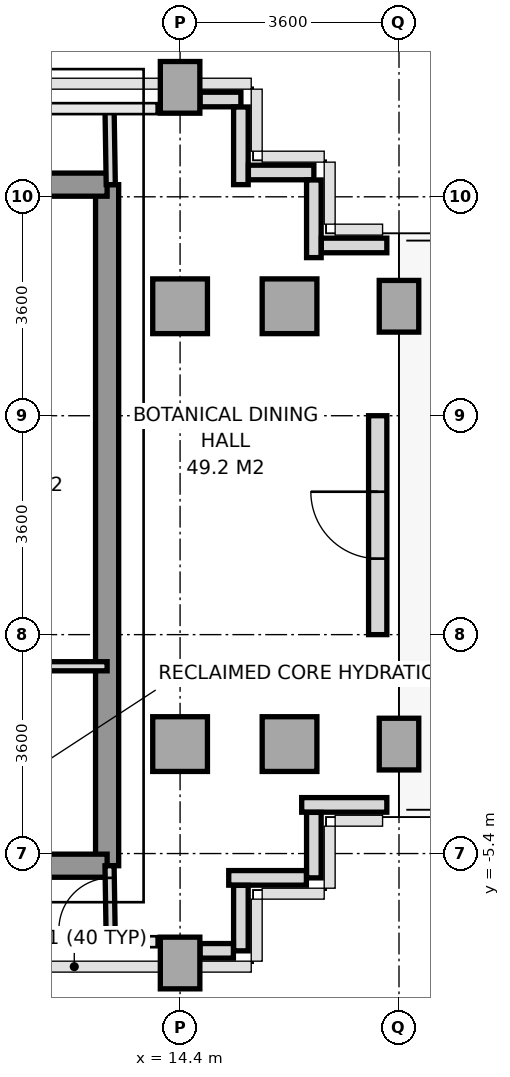
"""IFC4 building model, lengths in metres.
Left out: names, types, materials, properties, quantities, classifications, styles, units other than length and angle.
Written with IfcOpenShell. Run it as: python <this file> out.ifc"""

import sys

from ifc_helpers import new_model, si_unit, direction, frame, frame_2d, origin, origin_2d, place, context, subcontext, project, spatial, rectangle, extrude, source, transform, mapped, element, fill, save


model = new_model("IFC4")
c1 = context("Model", 3, precision=1e-05, world=origin(), true_north=direction((0.0, 1.0)))
c2 = subcontext(c1, "Body", "Model", "MODEL_VIEW")
j1 = project(units=[si_unit("LENGTHUNIT", "METRE"), si_unit("PLANEANGLEUNIT", "RADIAN")], contexts=[c1])
p1 = place(None, origin())
s1 = spatial("IfcSite", under=j1, at=p1, CompositionType="ELEMENT")
p2 = place(p1, origin())
s2 = spatial("IfcBuilding", under=s1, at=p2, CompositionType="ELEMENT")
p3 = place(p2, frame((0.0, 0.0, 156.2)))
s3 = spatial("IfcBuildingStorey", under=s2, at=p3, CompositionType="ELEMENT", Elevation=156.2)
m1 = source(origin(), c2, "Body", "SweptSolid", [
    extrude(rectangle(XDim=0.65, YDim=0.85, at=origin_2d()), origin(), (0.0, 0.0, 1.0), 4.0),
])
p4 = place(p3, frame((14.4, -7.2, 0.0), z_axis=(0.0, 0.0, 1.0), x_axis=(1.0, 0.0, 0.0)))
e1 = element("IfcColumn", 1, at=p4, inside=s3, PredefinedType="COLUMN", context=c2, shape_type="MappedRepresentation", body=[
    mapped(m1, transform((0.0, 0.0, 0.0), x_axis=(1.0, 0.0, 0.0), y_axis=(0.0, 1.0, 0.0), z_axis=(0.0, 0.0, 1.0), scale=1.0)),
])
m2 = source(origin(), c2, "Body", "SweptSolid", [
    extrude(rectangle(XDim=0.9, YDim=0.9, at=origin_2d()), origin(), (0.0, 0.0, 1.0), 4.0),
])
for number, where, z_axis, x_axis in (
    (2, (14.4, -3.6, 0.0), (0.0, 0.0, 1.0), (1.0, 0.0, 0.0)),
    (3, (14.4, 3.6, 0.0), (0.0, 0.0, 1.0), (1.0, 0.0, 0.0)),
):
    element("IfcColumn", number, at=place(p3, frame(where, z_axis=z_axis, x_axis=x_axis)), inside=s3, PredefinedType="COLUMN", context=c2, shape_type="MappedRepresentation", body=[
        mapped(m2, transform((0.0, 0.0, 0.0), x_axis=(1.0, 0.0, 0.0), y_axis=(0.0, 1.0, 0.0), z_axis=(0.0, 0.0, 1.0), scale=1.0)),
    ])
p5 = place(p3, frame((14.4, 7.2, 0.0), z_axis=(0.0, 0.0, 1.0), x_axis=(1.0, 0.0, 0.0)))
e4 = element("IfcColumn", 4, at=p5, inside=s3, PredefinedType="COLUMN", context=c2, shape_type="MappedRepresentation", body=[
    mapped(m1, transform((0.0, 0.0, 0.0), x_axis=(1.0, 0.0, 0.0), y_axis=(0.0, 1.0, 0.0), z_axis=(0.0, 0.0, 1.0), scale=1.0)),
])
for number, where, z_axis, x_axis in (
    (5, (16.2, -3.6, 0.0), (0.0, 0.0, 1.0), (1.0, 0.0, 0.0)),
    (6, (16.2, 3.6, 0.0), (0.0, 0.0, 1.0), (1.0, 0.0, 0.0)),
):
    element("IfcColumn", number, at=place(p3, frame(where, z_axis=z_axis, x_axis=x_axis)), inside=s3, PredefinedType="COLUMN", context=c2, shape_type="MappedRepresentation", body=[
        mapped(m2, transform((0.0, 0.0, 0.0), x_axis=(1.0, 0.0, 0.0), y_axis=(0.0, 1.0, 0.0), z_axis=(0.0, 0.0, 1.0), scale=1.0)),
    ])
for number, where, z_axis, x_axis in (
    (7, (18.0, -3.6, 0.0), (0.0, 0.0, 1.0), (1.0, 0.0, 0.0)),
    (8, (18.0, 3.6, 0.0), (0.0, 0.0, 1.0), (1.0, 0.0, 0.0)),
):
    element("IfcColumn", number, at=place(p3, frame(where, z_axis=z_axis, x_axis=x_axis)), inside=s3, PredefinedType="COLUMN", context=c2, shape_type="MappedRepresentation", body=[
        mapped(m1, transform((0.0, 0.0, 0.0), x_axis=(1.0, 0.0, 0.0), y_axis=(0.0, 1.0, 0.0), z_axis=(0.0, 0.0, 1.0), scale=1.0)),
    ])
p6 = place(p3, frame((17.65, -1.8, 0.0), z_axis=(0.0, 0.0, 1.0), x_axis=(0.0, 1.0, 0.0)))
e9 = element("IfcWall", 9, at=p6, inside=s3, PredefinedType="SOLIDWALL", context=c2, shape_type="SweptSolid", body=[
    extrude(rectangle(XDim=3.6, YDim=0.3, at=frame_2d((1.8, 0.0))), origin(), (0.0, 0.0, 1.0), 3.35),
])
p7 = place(p6, frame((1.25, 0.0, 0.0)))
e10 = element("IfcOpeningElement", 10, at=p7, cuts=e9, PredefinedType="OPENING", context=c2, shape_type="SweptSolid", body=[
    extrude(rectangle(XDim=1.1, YDim=2.3, at=frame_2d((0.55, 1.15))), frame((0.0, 0.16, 0.0), z_axis=(0.0, -1.0, 0.0), x_axis=(1.0, 0.0, 0.0)), (0.0, 0.0, 1.0), 0.32),
])
p8 = place(p3, frame((17.8, -4.6, 0.0), z_axis=(0.0, 0.0, 1.0), x_axis=(-1.0, 0.0, 0.0)))
e11 = element("IfcWall", 11, at=p8, inside=s3, PredefinedType="PARAPET", context=c2, shape_type="SweptSolid", body=[
    extrude(rectangle(XDim=1.4, YDim=0.24, at=frame_2d((0.7, 0.0))), origin(), (0.0, 0.0, 1.0), 1.15),
])
p9 = place(p3, frame((16.6, -4.723, 0.0), z_axis=(0.0, 0.0, 1.0), x_axis=(0.0, -1.0, 0.0)))
e12 = element("IfcWall", 12, at=p9, inside=s3, PredefinedType="PARAPET", context=c2, shape_type="SweptSolid", body=[
    extrude(rectangle(XDim=1.077, YDim=0.24, at=frame_2d((0.539, 0.0))), origin(), (0.0, 0.0, 1.0), 1.15),
])
p10 = place(p3, frame((16.477, -5.8, 0.0), z_axis=(0.0, 0.0, 1.0), x_axis=(-1.0, 0.0, 0.0)))
e13 = element("IfcWall", 13, at=p10, inside=s3, PredefinedType="PARAPET", context=c2, shape_type="SweptSolid", body=[
    extrude(rectangle(XDim=1.277, YDim=0.24, at=frame_2d((0.639, 0.0))), origin(), (0.0, 0.0, 1.0), 1.15),
])
p11 = place(p3, frame((15.4, -5.923, 0.0), z_axis=(0.0, 0.0, 1.0), x_axis=(0.0, -1.0, 0.0)))
e14 = element("IfcWall", 14, at=p11, inside=s3, PredefinedType="PARAPET", context=c2, shape_type="SweptSolid", body=[
    extrude(rectangle(XDim=1.077, YDim=0.24, at=frame_2d((0.539, 0.0))), origin(), (0.0, 0.0, 1.0), 1.15),
])
p12 = place(p3, frame((15.277, -7.0, 0.0), z_axis=(0.0, 0.0, 1.0), x_axis=(-1.0, 0.0, 0.0)))
e15 = element("IfcWall", 15, at=p12, inside=s3, PredefinedType="PARAPET", context=c2, shape_type="SweptSolid", body=[
    extrude(rectangle(XDim=0.549, YDim=0.24, at=frame_2d((0.274, 0.0))), origin(), (0.0, 0.0, 1.0), 1.15),
])
p13 = place(p3, frame((14.728, 7.0, 0.0), z_axis=(0.0, 0.0, 1.0), x_axis=(1.0, 0.0, 0.0)))
e16 = element("IfcWall", 16, at=p13, inside=s3, PredefinedType="PARAPET", context=c2, shape_type="SweptSolid", body=[
    extrude(rectangle(XDim=0.672, YDim=0.24, at=frame_2d((0.336, 0.0))), origin(), (0.0, 0.0, 1.0), 1.15),
])
p14 = place(p3, frame((15.4, 6.877, 0.0), z_axis=(0.0, 0.0, 1.0), x_axis=(0.0, -1.0, 0.0)))
e17 = element("IfcWall", 17, at=p14, inside=s3, PredefinedType="PARAPET", context=c2, shape_type="SweptSolid", body=[
    extrude(rectangle(XDim=1.277, YDim=0.24, at=frame_2d((0.638, 0.0))), origin(), (0.0, 0.0, 1.0), 1.15),
])
p15 = place(p3, frame((15.523, 5.8, 0.0), z_axis=(0.0, 0.0, 1.0), x_axis=(1.0, 0.0, 0.0)))
e18 = element("IfcWall", 18, at=p15, inside=s3, PredefinedType="PARAPET", context=c2, shape_type="SweptSolid", body=[
    extrude(rectangle(XDim=1.077, YDim=0.24, at=frame_2d((0.539, 0.0))), origin(), (0.0, 0.0, 1.0), 1.15),
])
p16 = place(p3, frame((16.6, 5.677, 0.0), z_axis=(0.0, 0.0, 1.0), x_axis=(0.0, -1.0, 0.0)))
e19 = element("IfcWall", 19, at=p16, inside=s3, PredefinedType="PARAPET", context=c2, shape_type="SweptSolid", body=[
    extrude(rectangle(XDim=1.277, YDim=0.24, at=frame_2d((0.639, 0.0))), origin(), (0.0, 0.0, 1.0), 1.15),
])
p17 = place(p3, frame((16.723, 4.6, 0.0), z_axis=(0.0, 0.0, 1.0), x_axis=(1.0, 0.0, 0.0)))
e20 = element("IfcWall", 20, at=p17, inside=s3, PredefinedType="PARAPET", context=c2, shape_type="SweptSolid", body=[
    extrude(rectangle(XDim=1.077, YDim=0.24, at=frame_2d((0.539, 0.0))), origin(), (0.0, 0.0, 1.0), 1.15),
])
p18 = place(p3, frame((13.2, -5.6, 0.0), z_axis=(0.0, 0.0, 1.0), x_axis=(0.0, 1.0, 0.0)))
e21 = element("IfcWall", 21, at=p18, inside=s3, PredefinedType="SHEAR", context=c2, shape_type="SweptSolid", body=[
    extrude(rectangle(XDim=11.2, YDim=0.38, at=frame_2d((5.6, 0.0))), origin(), (0.0, 0.0, 1.0), 4.0),
])
p19 = place(p3, frame((11.356, 5.6, 0.0), z_axis=(0.0, 0.0, 1.0), x_axis=(1.0, 0.0, 0.0)))
e22 = element("IfcWall", 22, at=p19, inside=s3, PredefinedType="SHEAR", context=c2, shape_type="SweptSolid", body=[
    extrude(rectangle(XDim=1.844, YDim=0.38, at=frame_2d((0.922, 0.0))), origin(), (0.0, 0.0, 1.0), 4.0),
])
p20 = place(p3, frame((5.4, -5.6, 0.0), z_axis=(0.0, 0.0, 1.0), x_axis=(1.0, 0.0, 0.0)))
e23 = element("IfcWall", 23, at=p20, inside=s3, PredefinedType="SHEAR", context=c2, shape_type="SweptSolid", body=[
    extrude(rectangle(XDim=7.8, YDim=0.38, at=frame_2d((3.9, 0.0))), origin(), (0.0, 0.0, 1.0), 4.0),
])
p21 = place(p20, frame((3.0, 0.0, 0.0)))
e24 = element("IfcOpeningElement", 24, at=p21, cuts=e23, PredefinedType="OPENING", context=c2, shape_type="SweptSolid", body=[
    extrude(rectangle(XDim=1.2, YDim=2.2, at=frame_2d((0.6, 1.1))), frame((0.0, 0.2, 0.0), z_axis=(0.0, -1.0, 0.0), x_axis=(1.0, 0.0, 0.0)), (0.0, 0.0, 1.0), 0.4),
])
p22 = place(p20, frame((5.85, 0.0, 0.0)))
e25 = element("IfcOpeningElement", 25, at=p22, cuts=e23, PredefinedType="OPENING", context=c2, shape_type="SweptSolid", body=[
    extrude(rectangle(XDim=0.8, YDim=2.1, at=frame_2d((0.4, 1.05))), frame((0.0, 0.2, 0.0), z_axis=(0.0, -1.0, 0.0), x_axis=(1.0, 0.0, 0.0)), (0.0, 0.0, 1.0), 0.4),
])
p23 = place(p3, frame((11.02, -2.32, 0.0), z_axis=(0.0, 0.0, 1.0), x_axis=(1.0, 0.0, 0.0)))
e26 = element("IfcWall", 26, at=p23, inside=s3, PredefinedType="PARTITIONING", context=c2, shape_type="SweptSolid", body=[
    extrude(rectangle(XDim=2.18, YDim=0.15, at=frame_2d((1.09, 0.0))), origin(), (0.0, 0.0, 1.0), 4.0),
])
p24 = place(p3, frame((13.26, 5.6, 0.0), z_axis=(0.0, 0.0, 1.0), x_axis=(-0.016013571389, 0.999871774545, 0.0)))
e27 = element("IfcWall", 27, at=p24, inside=s3, PredefinedType="PARTITIONING", context=c2, shape_type="SweptSolid", body=[
    extrude(rectangle(XDim=1.25, YDim=0.15, at=frame_2d((0.625, 0.0))), origin(), (0.0, 0.0, 1.0), 4.0),
])
p25 = place(p3, frame((13.26, -6.85, 0.0), z_axis=(0.0, 0.0, 1.0), x_axis=(-0.016013571389, 0.999871774545, 0.0)))
e28 = element("IfcWall", 28, at=p25, inside=s3, PredefinedType="PARTITIONING", context=c2, shape_type="SweptSolid", body=[
    extrude(rectangle(XDim=1.25, YDim=0.15, at=frame_2d((0.625, 0.0))), origin(), (0.0, 0.0, 1.0), 4.0),
])
p26 = place(p25, frame((0.2, 0.0, 0.0)))
e29 = element("IfcOpeningElement", 29, at=p26, cuts=e28, PredefinedType="OPENING", context=c2, shape_type="SweptSolid", body=[
    extrude(rectangle(XDim=0.85, YDim=2.1, at=frame_2d((0.425, 1.05))), frame((0.0, 0.085, 0.0), z_axis=(0.0, -1.0, 0.0), x_axis=(1.0, 0.0, 0.0)), (0.0, 0.0, 1.0), 0.17),
])
m3 = source(origin(), c2, "Body", "SweptSolid", [
    extrude(rectangle(XDim=1.1, YDim=2.3, at=frame_2d((0.55, 1.15))), frame((0.0, 0.025, 0.0), z_axis=(0.0, -1.0, 0.0), x_axis=(1.0, 0.0, 0.0)), (0.0, 0.0, 1.0), 0.05),
])
p27 = place(p7, frame((1.1, 0.0, 0.0), z_axis=(0.0, 0.0, 1.0), x_axis=(-1.0, 0.0, 0.0)))
e30 = element("IfcDoor", 30, at=p27, inside=s3, OperationType="SINGLE_SWING_RIGHT", PredefinedType="DOOR", context=c2, shape_type="MappedRepresentation", body=[
    mapped(m3, transform((0.0, 0.0, 0.0), x_axis=(1.0, 0.0, 0.0), y_axis=(0.0, 1.0, 0.0), z_axis=(0.0, 0.0, 1.0), scale=1.0)),
])
fill(e10, e30)
m4 = source(origin(), c2, "Body", "SweptSolid", [
    extrude(rectangle(XDim=0.85, YDim=2.1, at=frame_2d((0.425, 1.05))), frame((0.0, 0.025, 0.0), z_axis=(0.0, -1.0, 0.0), x_axis=(1.0, 0.0, 0.0)), (0.0, 0.0, 1.0), 0.05),
])
p28 = place(p26, origin())
e31 = element("IfcDoor", 31, at=p28, inside=s3, OperationType="SINGLE_SWING_LEFT", PredefinedType="DOOR", context=c2, shape_type="MappedRepresentation", body=[
    mapped(m4, transform((0.0, 0.0, 0.0), x_axis=(1.0, 0.0, 0.0), y_axis=(0.0, 1.0, 0.0), z_axis=(0.0, 0.0, 1.0), scale=1.0)),
])
fill(e29, e31)
save(model, sys.argv[1])
